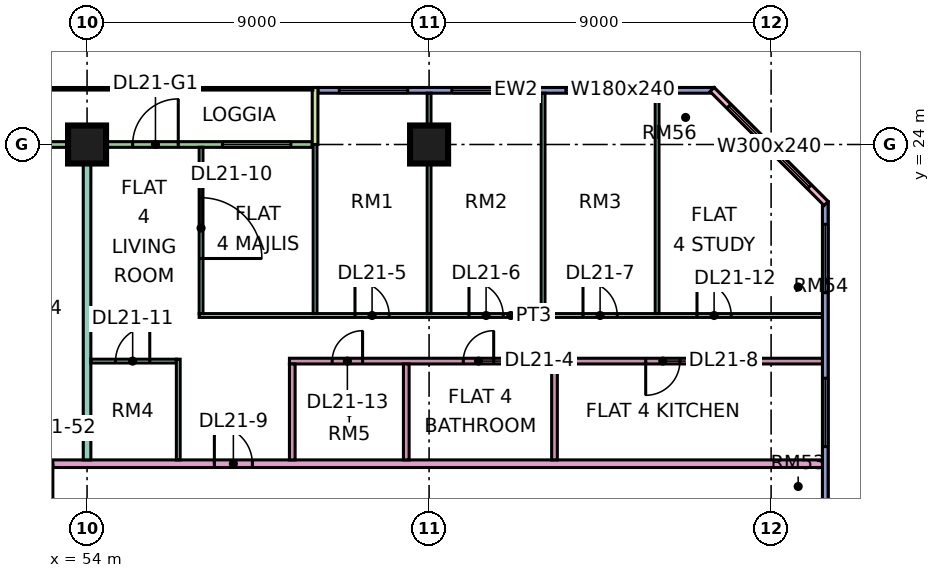
"""IFC4 building model, lengths in metres.
Left out: names, types, materials, properties, quantities, classifications, styles, units other than length and angle.
Written with IfcOpenShell. Run it as: python <this file> out.ifc"""

import sys

from ifc_helpers import new_model, si_unit, direction, frame, frame_2d, origin, origin_2d, place, context, subcontext, project, spatial, rectangle, extrude, element, fill, save


model = new_model("IFC4")
c1 = context("Model", 3, precision=1e-05, world=origin(), true_north=direction((0.0, 1.0)))
c2 = subcontext(c1, "Body", "Model", "MODEL_VIEW")
j1 = project(units=[si_unit("LENGTHUNIT", "METRE"), si_unit("PLANEANGLEUNIT", "RADIAN")], contexts=[c1])
p1 = place(None, origin())
s1 = spatial("IfcSite", under=j1, at=p1, CompositionType="ELEMENT")
p2 = place(p1, origin())
s2 = spatial("IfcBuilding", under=s1, at=p2, CompositionType="ELEMENT")
p3 = place(p2, frame((0.0, 0.0, 95.65)))
s3 = spatial("IfcBuildingStorey", under=s2, at=p3, CompositionType="ELEMENT", Elevation=95.65)
for number, where, z_axis, x_axis in (
    (1, (54.0, 24.0, 0.0), (0.0, 0.0, 1.0), (1.0, 0.0, 0.0)),
    (2, (63.0, 24.0, 0.0), (0.0, 0.0, 1.0), (1.0, 0.0, 0.0)),
):
    element("IfcColumn", number, at=place(p3, frame(where, z_axis=z_axis, x_axis=x_axis)), inside=s3, PredefinedType="COLUMN", context=c2, shape_type="SweptSolid", body=[
        extrude(rectangle(XDim=1.0, YDim=1.0, at=origin_2d()), origin(), (0.0, 0.0, 1.0), 3.75),
    ])
p4 = place(p3, frame((70.5, 25.425, 0.0), z_axis=(0.0, 0.0, 1.0), x_axis=(-1.0, 0.0, 0.0)))
e3 = element("IfcWall", 3, at=p4, inside=s3, PredefinedType="SOLIDWALL", context=c2, shape_type="SweptSolid", body=[
    extrude(rectangle(XDim=10.425, YDim=0.15, at=frame_2d((5.212, 0.0))), origin(), (0.0, 0.0, 1.0), 3.35),
])
p5 = place(p4, frame((2.1, 0.0, 0.45)))
e4 = element("IfcOpeningElement", 4, at=p5, cuts=e3, PredefinedType="OPENING", context=c2, shape_type="SweptSolid", body=[
    extrude(rectangle(XDim=1.8, YDim=2.4, at=frame_2d((0.9, 1.2))), frame((0.0, 0.085, 0.0), z_axis=(0.0, -1.0, 0.0), x_axis=(1.0, 0.0, 0.0)), (0.0, 0.0, 1.0), 0.17),
])
p6 = place(p4, frame((5.1, 0.0, 0.45)))
e5 = element("IfcOpeningElement", 5, at=p6, cuts=e3, PredefinedType="OPENING", context=c2, shape_type="SweptSolid", body=[
    extrude(rectangle(XDim=1.8, YDim=2.4, at=frame_2d((0.9, 1.2))), frame((0.0, 0.085, 0.0), z_axis=(0.0, -1.0, 0.0), x_axis=(1.0, 0.0, 0.0)), (0.0, 0.0, 1.0), 0.17),
])
p7 = place(p4, frame((8.062, 0.0, 0.45)))
e6 = element("IfcOpeningElement", 6, at=p7, cuts=e3, PredefinedType="OPENING", context=c2, shape_type="SweptSolid", body=[
    extrude(rectangle(XDim=1.8, YDim=2.4, at=frame_2d((0.9, 1.2))), frame((0.0, 0.085, 0.0), z_axis=(0.0, -1.0, 0.0), x_axis=(1.0, 0.0, 0.0)), (0.0, 0.0, 1.0), 0.17),
])
p8 = place(p3, frame((59.925, 24.0, 0.0), z_axis=(0.0, 0.0, 1.0), x_axis=(-1.0, 0.0, 0.0)))
e7 = element("IfcWall", 7, at=p8, inside=s3, PredefinedType="SOLIDWALL", context=c2, shape_type="SweptSolid", body=[
    extrude(rectangle(XDim=11.85, YDim=0.15, at=frame_2d((5.925, 0.0))), origin(), (0.0, 0.0, 1.0), 3.35),
])
p9 = place(p8, frame((0.562, 0.0, 0.45)))
e8 = element("IfcOpeningElement", 8, at=p9, cuts=e7, PredefinedType="OPENING", context=c2, shape_type="SweptSolid", body=[
    extrude(rectangle(XDim=1.8, YDim=2.4, at=frame_2d((0.9, 1.2))), frame((0.0, 0.085, 0.0), z_axis=(0.0, -1.0, 0.0), x_axis=(1.0, 0.0, 0.0)), (0.0, 0.0, 1.0), 0.17),
])
p10 = place(p8, frame((3.525, 0.0, 0.0)))
e9 = element("IfcOpeningElement", 9, at=p10, cuts=e7, PredefinedType="OPENING", context=c2, shape_type="SweptSolid", body=[
    extrude(rectangle(XDim=1.2, YDim=2.4, at=frame_2d((0.6, 1.2))), frame((0.0, 0.085, 0.0), z_axis=(0.0, -1.0, 0.0), x_axis=(1.0, 0.0, 0.0)), (0.0, 0.0, 1.0), 0.17),
])
p11 = place(p8, frame((7.087, 0.0, 0.45)))
e10 = element("IfcOpeningElement", 10, at=p11, cuts=e7, PredefinedType="OPENING", context=c2, shape_type="SweptSolid", body=[
    extrude(rectangle(XDim=4.2, YDim=2.4, at=frame_2d((2.1, 1.2))), frame((0.0, 0.085, 0.0), z_axis=(0.0, -1.0, 0.0), x_axis=(1.0, 0.0, 0.0)), (0.0, 0.0, 1.0), 0.17),
])
p12 = place(p3, frame((60.0, 25.5, 0.0), z_axis=(0.0, 0.0, 1.0), x_axis=(0.0, -1.0, 0.0)))
e11 = element("IfcWall", 11, at=p12, inside=s3, PredefinedType="SOLIDWALL", context=c2, shape_type="SweptSolid", body=[
    extrude(rectangle(XDim=1.5, YDim=0.15, at=frame_2d((0.75, 0.0))), origin(), (0.0, 0.0, 1.0), 3.35),
])
p13 = place(p3, frame((73.425, 12.075, 0.0), z_axis=(0.0, 0.0, 1.0), x_axis=(0.0, 1.0, 0.0)))
e12 = element("IfcWall", 12, at=p13, inside=s3, PredefinedType="SOLIDWALL", context=c2, shape_type="SweptSolid", body=[
    extrude(rectangle(XDim=10.425, YDim=0.15, at=frame_2d((5.212, 0.0))), origin(), (0.0, 0.0, 1.0), 3.35),
])
p14 = place(p13, frame((3.975, 0.0, 0.45)))
e13 = element("IfcOpeningElement", 13, at=p14, cuts=e12, PredefinedType="OPENING", context=c2, shape_type="SweptSolid", body=[
    extrude(rectangle(XDim=1.8, YDim=2.4, at=frame_2d((0.9, 1.2))), frame((0.0, 0.085, 0.0), z_axis=(0.0, -1.0, 0.0), x_axis=(1.0, 0.0, 0.0)), (0.0, 0.0, 1.0), 0.17),
])
p15 = place(p13, frame((8.025, 0.0, 0.45)))
e14 = element("IfcOpeningElement", 14, at=p15, cuts=e12, PredefinedType="OPENING", context=c2, shape_type="SweptSolid", body=[
    extrude(rectangle(XDim=1.8, YDim=2.4, at=frame_2d((0.9, 1.2))), frame((0.0, 0.085, 0.0), z_axis=(0.0, -1.0, 0.0), x_axis=(1.0, 0.0, 0.0)), (0.0, 0.0, 1.0), 0.17),
])
p16 = place(p3, frame((73.447, 22.447, 0.0), z_axis=(0.0, 0.0, 1.0), x_axis=(-0.707106781187, 0.707106781187, 0.0)))
e15 = element("IfcWall", 15, at=p16, inside=s3, PredefinedType="SOLIDWALL", context=c2, shape_type="SweptSolid", body=[
    extrude(rectangle(XDim=4.243, YDim=0.15, at=frame_2d((2.121, 0.0))), origin(), (0.0, 0.0, 1.0), 3.35),
])
p17 = place(p16, frame((0.621, 0.0, 0.45)))
e16 = element("IfcOpeningElement", 16, at=p17, cuts=e15, PredefinedType="OPENING", context=c2, shape_type="SweptSolid", body=[
    extrude(rectangle(XDim=3.0, YDim=2.4, at=frame_2d((1.5, 1.2))), frame((0.0, 0.085, 0.0), z_axis=(0.0, -1.0, 0.0), x_axis=(1.0, 0.0, 0.0)), (0.0, 0.0, 1.0), 0.17),
])
p18 = place(p3, frame((51.225, 15.6, 0.0), z_axis=(0.0, 0.0, 1.0), x_axis=(1.0, 0.0, 0.0)))
e17 = element("IfcWall", 17, at=p18, inside=s3, PredefinedType="PARTITIONING", context=c2, shape_type="SweptSolid", body=[
    extrude(rectangle(XDim=22.125, YDim=0.2, at=frame_2d((11.062, 0.0))), origin(), (0.0, 0.0, 1.0), 3.35),
])
p19 = place(p18, frame((6.125, 0.0, 0.0)))
e18 = element("IfcOpeningElement", 18, at=p19, cuts=e17, PredefinedType="OPENING", context=c2, shape_type="SweptSolid", body=[
    extrude(rectangle(XDim=1.0, YDim=2.1, at=frame_2d((0.5, 1.05))), frame((0.0, 0.11, 0.0), z_axis=(0.0, -1.0, 0.0), x_axis=(1.0, 0.0, 0.0)), (0.0, 0.0, 1.0), 0.22),
])
p20 = place(p18, frame((0.875, 0.0, 0.0)))
e19 = element("IfcOpeningElement", 19, at=p20, cuts=e17, PredefinedType="OPENING", context=c2, shape_type="SweptSolid", body=[
    extrude(rectangle(XDim=1.0, YDim=2.1, at=frame_2d((0.5, 1.05))), frame((0.0, 0.11, 0.0), z_axis=(0.0, -1.0, 0.0), x_axis=(1.0, 0.0, 0.0)), (0.0, 0.0, 1.0), 0.22),
])
p21 = place(p3, frame((54.0, 15.7, 0.0), z_axis=(0.0, 0.0, 1.0), x_axis=(0.0, 1.0, 0.0)))
e20 = element("IfcWall", 20, at=p21, inside=s3, PredefinedType="PARTITIONING", context=c2, shape_type="SweptSolid", body=[
    extrude(rectangle(XDim=8.226, YDim=0.2, at=frame_2d((4.113, 0.0))), origin(), (0.0, 0.0, 1.0), 3.35),
])
p22 = place(p3, frame((54.1, 18.3, 0.0), z_axis=(0.0, 0.0, 1.0), x_axis=(1.0, 0.0, 0.0)))
e21 = element("IfcWall", 21, at=p22, inside=s3, PredefinedType="PARTITIONING", context=c2, shape_type="SweptSolid", body=[
    extrude(rectangle(XDim=2.25, YDim=0.1, at=frame_2d((1.125, 0.0))), origin(), (0.0, 0.0, 1.0), 3.35),
])
p23 = place(p22, frame((0.65, 0.0, 0.0)))
e22 = element("IfcOpeningElement", 22, at=p23, cuts=e21, PredefinedType="OPENING", context=c2, shape_type="SweptSolid", body=[
    extrude(rectangle(XDim=0.9, YDim=2.1, at=frame_2d((0.45, 1.05))), frame((0.0, 0.06, 0.0), z_axis=(0.0, -1.0, 0.0), x_axis=(1.0, 0.0, 0.0)), (0.0, 0.0, 1.0), 0.12),
])
p24 = place(p3, frame((56.4, 15.7, 0.0), z_axis=(0.0, 0.0, 1.0), x_axis=(0.0, 1.0, 0.0)))
e23 = element("IfcWall", 23, at=p24, inside=s3, PredefinedType="PARTITIONING", context=c2, shape_type="SweptSolid", body=[
    extrude(rectangle(XDim=2.65, YDim=0.1, at=frame_2d((1.325, 0.0))), origin(), (0.0, 0.0, 1.0), 3.35),
])
p25 = place(p3, frame((56.95, 19.5, 0.0), z_axis=(0.0, 0.0, 1.0), x_axis=(1.0, 0.0, 0.0)))
e24 = element("IfcWall", 24, at=p25, inside=s3, PredefinedType="PARTITIONING", context=c2, shape_type="SweptSolid", body=[
    extrude(rectangle(XDim=16.4, YDim=0.1, at=frame_2d((8.2, 0.0))), origin(), (0.0, 0.0, 1.0), 3.35),
])
p26 = place(p25, frame((4.1, 0.0, 0.0)))
e25 = element("IfcOpeningElement", 25, at=p26, cuts=e24, PredefinedType="OPENING", context=c2, shape_type="SweptSolid", body=[
    extrude(rectangle(XDim=0.9, YDim=2.1, at=frame_2d((0.45, 1.05))), frame((0.0, 0.06, 0.0), z_axis=(0.0, -1.0, 0.0), x_axis=(1.0, 0.0, 0.0)), (0.0, 0.0, 1.0), 0.12),
])
p27 = place(p25, frame((7.1, 0.0, 0.0)))
e26 = element("IfcOpeningElement", 26, at=p27, cuts=e24, PredefinedType="OPENING", context=c2, shape_type="SweptSolid", body=[
    extrude(rectangle(XDim=0.9, YDim=2.1, at=frame_2d((0.45, 1.05))), frame((0.0, 0.06, 0.0), z_axis=(0.0, -1.0, 0.0), x_axis=(1.0, 0.0, 0.0)), (0.0, 0.0, 1.0), 0.12),
])
p28 = place(p25, frame((10.1, 0.0, 0.0)))
e27 = element("IfcOpeningElement", 27, at=p28, cuts=e24, PredefinedType="OPENING", context=c2, shape_type="SweptSolid", body=[
    extrude(rectangle(XDim=0.9, YDim=2.1, at=frame_2d((0.45, 1.05))), frame((0.0, 0.06, 0.0), z_axis=(0.0, -1.0, 0.0), x_axis=(1.0, 0.0, 0.0)), (0.0, 0.0, 1.0), 0.12),
])
p29 = place(p25, frame((13.1, 0.0, 0.0)))
e28 = element("IfcOpeningElement", 28, at=p29, cuts=e24, PredefinedType="OPENING", context=c2, shape_type="SweptSolid", body=[
    extrude(rectangle(XDim=0.9, YDim=2.1, at=frame_2d((0.45, 1.05))), frame((0.0, 0.06, 0.0), z_axis=(0.0, -1.0, 0.0), x_axis=(1.0, 0.0, 0.0)), (0.0, 0.0, 1.0), 0.12),
])
p30 = place(p3, frame((57.0, 19.55, 0.0), z_axis=(0.0, 0.0, 1.0), x_axis=(0.0, 1.0, 0.0)))
e29 = element("IfcWall", 29, at=p30, inside=s3, PredefinedType="PARTITIONING", context=c2, shape_type="SweptSolid", body=[
    extrude(rectangle(XDim=4.376, YDim=0.1, at=frame_2d((2.188, 0.0))), origin(), (0.0, 0.0, 1.0), 3.35),
])
p31 = place(p30, frame((1.45, 0.0, 0.0)))
e30 = element("IfcOpeningElement", 30, at=p31, cuts=e29, PredefinedType="OPENING", context=c2, shape_type="SweptSolid", body=[
    extrude(rectangle(XDim=1.6, YDim=2.1, at=frame_2d((0.8, 1.05))), frame((0.0, 0.06, 0.0), z_axis=(0.0, -1.0, 0.0), x_axis=(1.0, 0.0, 0.0)), (0.0, 0.0, 1.0), 0.12),
])
p32 = place(p3, frame((59.325, 18.3, 0.0), z_axis=(0.0, 0.0, 1.0), x_axis=(1.0, 0.0, 0.0)))
e31 = element("IfcWall", 31, at=p32, inside=s3, PredefinedType="PARTITIONING", context=c2, shape_type="SweptSolid", body=[
    extrude(rectangle(XDim=14.025, YDim=0.15, at=frame_2d((7.013, 0.0))), origin(), (0.0, 0.0, 1.0), 3.35),
])
p33 = place(p32, frame((4.575, 0.0, 0.0)))
e32 = element("IfcOpeningElement", 32, at=p33, cuts=e31, PredefinedType="OPENING", context=c2, shape_type="SweptSolid", body=[
    extrude(rectangle(XDim=0.8, YDim=2.1, at=frame_2d((0.4, 1.05))), frame((0.0, 0.085, 0.0), z_axis=(0.0, -1.0, 0.0), x_axis=(1.0, 0.0, 0.0)), (0.0, 0.0, 1.0), 0.17),
])
p34 = place(p32, frame((9.375, 0.0, 0.0)))
e33 = element("IfcOpeningElement", 33, at=p34, cuts=e31, PredefinedType="OPENING", context=c2, shape_type="SweptSolid", body=[
    extrude(rectangle(XDim=0.9, YDim=2.1, at=frame_2d((0.45, 1.05))), frame((0.0, 0.085, 0.0), z_axis=(0.0, -1.0, 0.0), x_axis=(1.0, 0.0, 0.0)), (0.0, 0.0, 1.0), 0.17),
])
p35 = place(p32, frame((1.125, 0.0, 0.0)))
e34 = element("IfcOpeningElement", 34, at=p35, cuts=e31, PredefinedType="OPENING", context=c2, shape_type="SweptSolid", body=[
    extrude(rectangle(XDim=0.8, YDim=2.1, at=frame_2d((0.4, 1.05))), frame((0.0, 0.085, 0.0), z_axis=(0.0, -1.0, 0.0), x_axis=(1.0, 0.0, 0.0)), (0.0, 0.0, 1.0), 0.17),
])
p36 = place(p3, frame((59.4, 15.7, 0.0), z_axis=(0.0, 0.0, 1.0), x_axis=(0.0, 1.0, 0.0)))
e35 = element("IfcWall", 35, at=p36, inside=s3, PredefinedType="PARTITIONING", context=c2, shape_type="SweptSolid", body=[
    extrude(rectangle(XDim=2.525, YDim=0.15, at=frame_2d((1.263, 0.0))), origin(), (0.0, 0.0, 1.0), 3.35),
])
p37 = place(p3, frame((60.0, 19.55, 0.0), z_axis=(0.0, 0.0, 1.0), x_axis=(0.0, 1.0, 0.0)))
e36 = element("IfcWall", 36, at=p37, inside=s3, PredefinedType="PARTITIONING", context=c2, shape_type="SweptSolid", body=[
    extrude(rectangle(XDim=4.45, YDim=0.1, at=frame_2d((2.225, 0.0))), origin(), (0.0, 0.0, 1.0), 3.35),
])
p38 = place(p3, frame((62.4, 15.7, 0.0), z_axis=(0.0, 0.0, 1.0), x_axis=(0.0, 1.0, 0.0)))
e37 = element("IfcWall", 37, at=p38, inside=s3, PredefinedType="PARTITIONING", context=c2, shape_type="SweptSolid", body=[
    extrude(rectangle(XDim=2.525, YDim=0.15, at=frame_2d((1.263, 0.0))), origin(), (0.0, 0.0, 1.0), 3.35),
])
for number, where, z_axis, x_axis in (
    (38, (63.0, 19.55, 0.0), (0.0, 0.0, 1.0), (0.0, 1.0, 0.0)),
    (39, (66.0, 19.55, 0.0), (0.0, 0.0, 1.0), (0.0, 1.0, 0.0)),
):
    element("IfcWall", number, at=place(p3, frame(where, z_axis=z_axis, x_axis=x_axis)), inside=s3, PredefinedType="PARTITIONING", context=c2, shape_type="SweptSolid", body=[
        extrude(rectangle(XDim=5.801, YDim=0.1, at=frame_2d((2.9, 0.0))), origin(), (0.0, 0.0, 1.0), 3.35),
    ])
p39 = place(p3, frame((66.3, 15.7, 0.0), z_axis=(0.0, 0.0, 1.0), x_axis=(0.0, 1.0, 0.0)))
e40 = element("IfcWall", 40, at=p39, inside=s3, PredefinedType="PARTITIONING", context=c2, shape_type="SweptSolid", body=[
    extrude(rectangle(XDim=2.525, YDim=0.15, at=frame_2d((1.263, 0.0))), origin(), (0.0, 0.0, 1.0), 3.35),
])
p40 = place(p3, frame((69.0, 19.55, 0.0), z_axis=(0.0, 0.0, 1.0), x_axis=(0.0, 1.0, 0.0)))
e41 = element("IfcWall", 41, at=p40, inside=s3, PredefinedType="PARTITIONING", context=c2, shape_type="SweptSolid", body=[
    extrude(rectangle(XDim=5.8, YDim=0.1, at=frame_2d((2.9, 0.0))), origin(), (0.0, 0.0, 1.0), 3.35),
])
p41 = place(p5, origin())
e42 = element("IfcWindow", 42, at=p41, inside=s3, PartitioningType="SINGLE_PANEL", PredefinedType="WINDOW", context=c2, shape_type="SweptSolid", body=[
    extrude(rectangle(XDim=1.8, YDim=2.4, at=frame_2d((0.9, 1.2))), frame((0.0, 0.03, 0.0), z_axis=(0.0, -1.0, 0.0), x_axis=(1.0, 0.0, 0.0)), (0.0, 0.0, 1.0), 0.06),
])
fill(e4, e42)
p42 = place(p6, origin())
e43 = element("IfcWindow", 43, at=p42, inside=s3, PartitioningType="SINGLE_PANEL", PredefinedType="WINDOW", context=c2, shape_type="SweptSolid", body=[
    extrude(rectangle(XDim=1.8, YDim=2.4, at=frame_2d((0.9, 1.2))), frame((0.0, 0.03, 0.0), z_axis=(0.0, -1.0, 0.0), x_axis=(1.0, 0.0, 0.0)), (0.0, 0.0, 1.0), 0.06),
])
fill(e5, e43)
p43 = place(p7, origin())
e44 = element("IfcWindow", 44, at=p43, inside=s3, PartitioningType="SINGLE_PANEL", PredefinedType="WINDOW", context=c2, shape_type="SweptSolid", body=[
    extrude(rectangle(XDim=1.8, YDim=2.4, at=frame_2d((0.9, 1.2))), frame((0.0, 0.03, 0.0), z_axis=(0.0, -1.0, 0.0), x_axis=(1.0, 0.0, 0.0)), (0.0, 0.0, 1.0), 0.06),
])
fill(e6, e44)
p44 = place(p9, origin())
e45 = element("IfcWindow", 45, at=p44, inside=s3, PartitioningType="SINGLE_PANEL", PredefinedType="WINDOW", context=c2, shape_type="SweptSolid", body=[
    extrude(rectangle(XDim=1.8, YDim=2.4, at=frame_2d((0.9, 1.2))), frame((0.0, 0.03, 0.0), z_axis=(0.0, -1.0, 0.0), x_axis=(1.0, 0.0, 0.0)), (0.0, 0.0, 1.0), 0.06),
])
fill(e8, e45)
p45 = place(p10, frame((1.2, 0.0, 0.0), z_axis=(0.0, 0.0, 1.0), x_axis=(-1.0, 0.0, 0.0)))
e46 = element("IfcDoor", 46, at=p45, inside=s3, OperationType="DOUBLE_DOOR_SINGLE_SWING", PredefinedType="DOOR", context=c2, shape_type="SweptSolid", body=[
    extrude(rectangle(XDim=1.2, YDim=2.4, at=frame_2d((0.6, 1.2))), frame((0.0, 0.025, 0.0), z_axis=(0.0, -1.0, 0.0), x_axis=(1.0, 0.0, 0.0)), (0.0, 0.0, 1.0), 0.05),
])
fill(e9, e46)
p46 = place(p14, origin())
e47 = element("IfcWindow", 47, at=p46, inside=s3, PartitioningType="SINGLE_PANEL", PredefinedType="WINDOW", context=c2, shape_type="SweptSolid", body=[
    extrude(rectangle(XDim=1.8, YDim=2.4, at=frame_2d((0.9, 1.2))), frame((0.0, 0.03, 0.0), z_axis=(0.0, -1.0, 0.0), x_axis=(1.0, 0.0, 0.0)), (0.0, 0.0, 1.0), 0.06),
])
fill(e13, e47)
p47 = place(p15, origin())
e48 = element("IfcWindow", 48, at=p47, inside=s3, PartitioningType="SINGLE_PANEL", PredefinedType="WINDOW", context=c2, shape_type="SweptSolid", body=[
    extrude(rectangle(XDim=1.8, YDim=2.4, at=frame_2d((0.9, 1.2))), frame((0.0, 0.03, 0.0), z_axis=(0.0, -1.0, 0.0), x_axis=(1.0, 0.0, 0.0)), (0.0, 0.0, 1.0), 0.06),
])
fill(e14, e48)
p48 = place(p17, origin())
e49 = element("IfcWindow", 49, at=p48, inside=s3, PartitioningType="SINGLE_PANEL", PredefinedType="WINDOW", context=c2, shape_type="SweptSolid", body=[
    extrude(rectangle(XDim=3.0, YDim=2.4, at=frame_2d((1.5, 1.2))), frame((0.0, 0.03, 0.0), z_axis=(0.0, -1.0, 0.0), x_axis=(1.0, 0.0, 0.0)), (0.0, 0.0, 1.0), 0.06),
])
fill(e16, e49)
p49 = place(p33, frame((0.8, 0.0, 0.0), z_axis=(0.0, 0.0, 1.0), x_axis=(-1.0, 0.0, 0.0)))
e50 = element("IfcDoor", 50, at=p49, inside=s3, OperationType="SINGLE_SWING_RIGHT", PredefinedType="DOOR", context=c2, shape_type="SweptSolid", body=[
    extrude(rectangle(XDim=0.8, YDim=2.1, at=frame_2d((0.4, 1.05))), frame((0.0, 0.025, 0.0), z_axis=(0.0, -1.0, 0.0), x_axis=(1.0, 0.0, 0.0)), (0.0, 0.0, 1.0), 0.05),
])
fill(e32, e50)
p50 = place(p26, origin())
e51 = element("IfcDoor", 51, at=p50, inside=s3, OperationType="SINGLE_SWING_LEFT", PredefinedType="DOOR", context=c2, shape_type="SweptSolid", body=[
    extrude(rectangle(XDim=0.9, YDim=2.1, at=frame_2d((0.45, 1.05))), frame((0.0, 0.025, 0.0), z_axis=(0.0, -1.0, 0.0), x_axis=(1.0, 0.0, 0.0)), (0.0, 0.0, 1.0), 0.05),
])
fill(e25, e51)
p51 = place(p27, origin())
e52 = element("IfcDoor", 52, at=p51, inside=s3, OperationType="SINGLE_SWING_LEFT", PredefinedType="DOOR", context=c2, shape_type="SweptSolid", body=[
    extrude(rectangle(XDim=0.9, YDim=2.1, at=frame_2d((0.45, 1.05))), frame((0.0, 0.025, 0.0), z_axis=(0.0, -1.0, 0.0), x_axis=(1.0, 0.0, 0.0)), (0.0, 0.0, 1.0), 0.05),
])
fill(e26, e52)
p52 = place(p28, origin())
e53 = element("IfcDoor", 53, at=p52, inside=s3, OperationType="SINGLE_SWING_LEFT", PredefinedType="DOOR", context=c2, shape_type="SweptSolid", body=[
    extrude(rectangle(XDim=0.9, YDim=2.1, at=frame_2d((0.45, 1.05))), frame((0.0, 0.025, 0.0), z_axis=(0.0, -1.0, 0.0), x_axis=(1.0, 0.0, 0.0)), (0.0, 0.0, 1.0), 0.05),
])
fill(e27, e53)
p53 = place(p34, frame((0.9, 0.0, 0.0), z_axis=(0.0, 0.0, 1.0), x_axis=(-1.0, 0.0, 0.0)))
e54 = element("IfcDoor", 54, at=p53, inside=s3, OperationType="SINGLE_SWING_LEFT", PredefinedType="DOOR", context=c2, shape_type="SweptSolid", body=[
    extrude(rectangle(XDim=0.9, YDim=2.1, at=frame_2d((0.45, 1.05))), frame((0.0, 0.025, 0.0), z_axis=(0.0, -1.0, 0.0), x_axis=(1.0, 0.0, 0.0)), (0.0, 0.0, 1.0), 0.05),
])
fill(e33, e54)
p54 = place(p19, origin())
e55 = element("IfcDoor", 55, at=p54, inside=s3, OperationType="SINGLE_SWING_LEFT", PredefinedType="DOOR", context=c2, shape_type="SweptSolid", body=[
    extrude(rectangle(XDim=1.0, YDim=2.1, at=frame_2d((0.5, 1.05))), frame((0.0, 0.025, 0.0), z_axis=(0.0, -1.0, 0.0), x_axis=(1.0, 0.0, 0.0)), (0.0, 0.0, 1.0), 0.05),
])
fill(e18, e55)
p55 = place(p31, frame((1.6, 0.0, 0.0), z_axis=(0.0, 0.0, 1.0), x_axis=(-1.0, 0.0, 0.0)))
e56 = element("IfcDoor", 56, at=p55, inside=s3, OperationType="DOUBLE_DOOR_SINGLE_SWING", PredefinedType="DOOR", context=c2, shape_type="SweptSolid", body=[
    extrude(rectangle(XDim=1.6, YDim=2.1, at=frame_2d((0.8, 1.05))), frame((0.0, 0.025, 0.0), z_axis=(0.0, -1.0, 0.0), x_axis=(1.0, 0.0, 0.0)), (0.0, 0.0, 1.0), 0.05),
])
fill(e30, e56)
p56 = place(p23, frame((0.9, 0.0, 0.0), z_axis=(0.0, 0.0, 1.0), x_axis=(-1.0, 0.0, 0.0)))
e57 = element("IfcDoor", 57, at=p56, inside=s3, OperationType="SINGLE_SWING_RIGHT", PredefinedType="DOOR", context=c2, shape_type="SweptSolid", body=[
    extrude(rectangle(XDim=0.9, YDim=2.1, at=frame_2d((0.45, 1.05))), frame((0.0, 0.025, 0.0), z_axis=(0.0, -1.0, 0.0), x_axis=(1.0, 0.0, 0.0)), (0.0, 0.0, 1.0), 0.05),
])
fill(e22, e57)
p57 = place(p29, origin())
e58 = element("IfcDoor", 58, at=p57, inside=s3, OperationType="SINGLE_SWING_LEFT", PredefinedType="DOOR", context=c2, shape_type="SweptSolid", body=[
    extrude(rectangle(XDim=0.9, YDim=2.1, at=frame_2d((0.45, 1.05))), frame((0.0, 0.025, 0.0), z_axis=(0.0, -1.0, 0.0), x_axis=(1.0, 0.0, 0.0)), (0.0, 0.0, 1.0), 0.05),
])
fill(e28, e58)
p58 = place(p35, frame((0.8, 0.0, 0.0), z_axis=(0.0, 0.0, 1.0), x_axis=(-1.0, 0.0, 0.0)))
e59 = element("IfcDoor", 59, at=p58, inside=s3, OperationType="SINGLE_SWING_RIGHT", PredefinedType="DOOR", context=c2, shape_type="SweptSolid", body=[
    extrude(rectangle(XDim=0.8, YDim=2.1, at=frame_2d((0.4, 1.05))), frame((0.0, 0.025, 0.0), z_axis=(0.0, -1.0, 0.0), x_axis=(1.0, 0.0, 0.0)), (0.0, 0.0, 1.0), 0.05),
])
fill(e34, e59)
p59 = place(p20, origin())
e60 = element("IfcDoor", 60, at=p59, inside=s3, OperationType="SINGLE_SWING_RIGHT", PredefinedType="DOOR", context=c2, shape_type="SweptSolid", body=[
    extrude(rectangle(XDim=1.0, YDim=2.1, at=frame_2d((0.5, 1.05))), frame((0.0, 0.025, 0.0), z_axis=(0.0, -1.0, 0.0), x_axis=(1.0, 0.0, 0.0)), (0.0, 0.0, 1.0), 0.05),
])
fill(e19, e60)
save(model, sys.argv[1])
